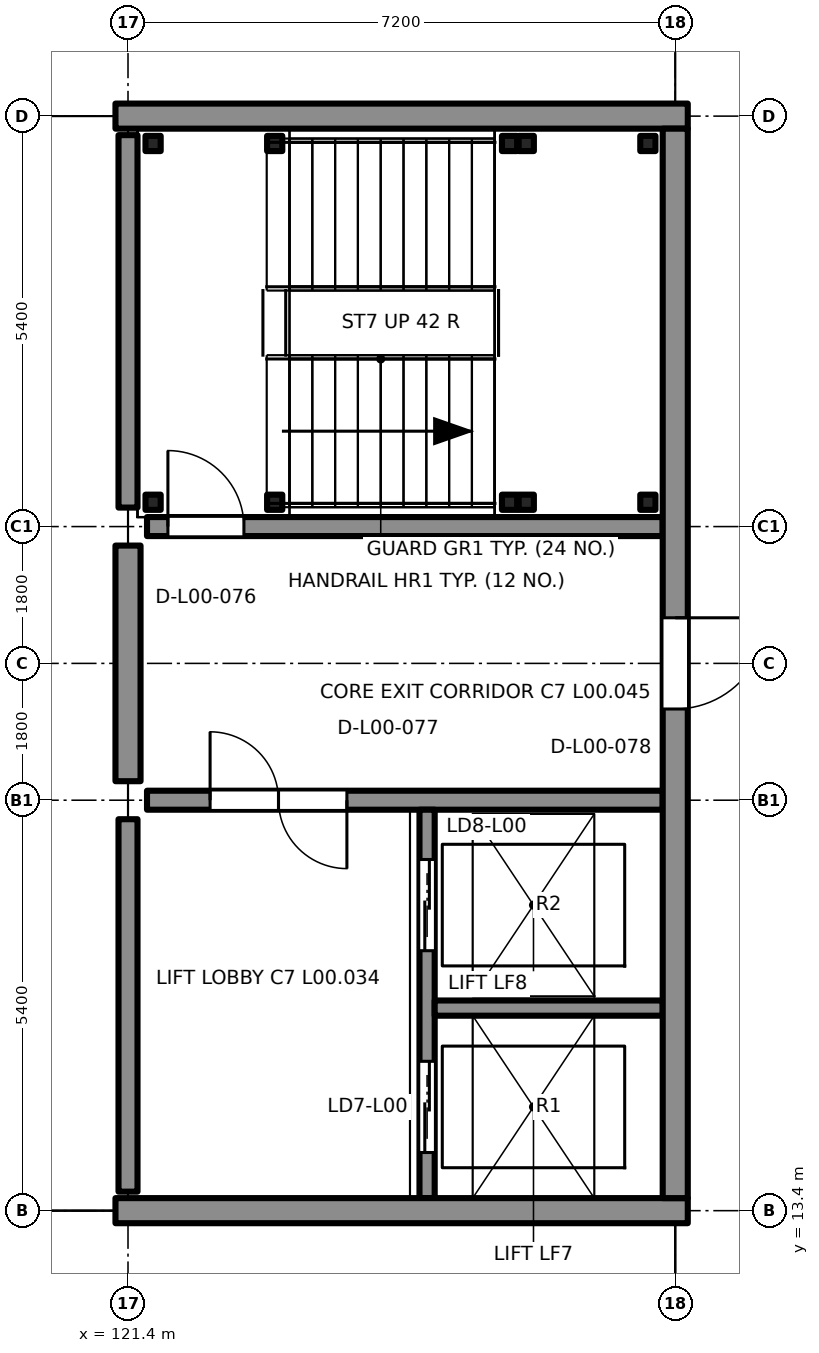
"""IFC4 building model, lengths in metres.
Left out: names, types, materials, properties, quantities, classifications, styles, units other than length and angle.
Written with IfcOpenShell. Run it as: python <this file> out.ifc"""

import sys

from ifc_helpers import new_model, si_unit, direction, frame, frame_2d, origin, origin_2d, place, context, subcontext, project, spatial, rectangle, extrude, element, fill, save


model = new_model("IFC4")
c1 = context("Model", 3, precision=1e-05, world=origin(), true_north=direction((0.0, 1.0)))
c2 = subcontext(c1, "Body", "Model", "MODEL_VIEW")
j1 = project(units=[si_unit("LENGTHUNIT", "METRE"), si_unit("PLANEANGLEUNIT", "RADIAN")], contexts=[c1])
p1 = place(None, origin())
s1 = spatial("IfcSite", under=j1, at=p1, CompositionType="ELEMENT")
p2 = place(p1, origin())
s2 = spatial("IfcBuilding", under=s1, at=p2, CompositionType="ELEMENT")
p3 = place(p2, origin())
s3 = spatial("IfcBuildingStorey", under=s2, at=p3, CompositionType="ELEMENT", Elevation=0.0)
for number, where, z_axis, x_axis in (
    (1, (115.2, 13.4, -0.2), (0.0, 0.0, 1.0), (1.0, 0.0, 0.0)),
    (2, (115.2, 27.8, -0.2), (0.0, 0.0, 1.0), (1.0, 0.0, 0.0)),
):
    element("IfcColumn", number, at=place(p3, frame(where, z_axis=z_axis, x_axis=x_axis)), inside=s3, PredefinedType="COLUMN", context=c2, shape_type="SweptSolid", body=[
        extrude(rectangle(XDim=1.6, YDim=1.2, at=origin_2d()), origin(), (0.736, 0.0, 0.677), 6.794),
    ])
p4 = place(p3, frame((121.65, 22.4, 0.0), z_axis=(0.0, 0.0, 1.0), x_axis=(1.0, 0.0, 0.0)))
e3 = element("IfcWall", 3, at=p4, inside=s3, PredefinedType="SHEAR", context=c2, shape_type="SweptSolid", body=[
    extrude(rectangle(XDim=6.785, YDim=0.25, at=frame_2d((3.393, 0.0))), origin(), (0.0, 0.0, 1.0), 5.9),
])
p5 = place(p4, frame((0.275, 0.0, 0.0)))
e4 = element("IfcOpeningElement", 4, at=p5, cuts=e3, PredefinedType="OPENING", context=c2, shape_type="SweptSolid", body=[
    extrude(rectangle(XDim=1.0, YDim=2.1, at=frame_2d((0.5, 1.05))), frame((0.0, 0.135, 0.0), z_axis=(0.0, -1.0, 0.0), x_axis=(1.0, 0.0, 0.0)), (0.0, 0.0, 1.0), 0.27),
])
p6 = place(p3, frame((121.4, 22.65, 0.0), z_axis=(0.0, 0.0, 1.0), x_axis=(0.0, 1.0, 0.0)))
e5 = element("IfcWall", 5, at=p6, inside=s3, PredefinedType="SHEAR", context=c2, shape_type="SweptSolid", body=[
    extrude(rectangle(XDim=4.9, YDim=0.25, at=frame_2d((2.45, 0.0))), origin(), (0.0, 0.0, 1.0), 4.4),
])
p7 = place(p3, frame((121.65, 18.8, -1.4), z_axis=(0.0, 0.0, 1.0), x_axis=(1.0, 0.0, 0.0)))
e6 = element("IfcWall", 6, at=p7, inside=s3, PredefinedType="SHEAR", context=c2, shape_type="SweptSolid", body=[
    extrude(rectangle(XDim=6.785, YDim=0.25, at=frame_2d((3.393, 0.0))), origin(), (0.0, 0.0, 1.0), 7.3),
])
p8 = place(p7, frame((0.83, 0.0, 1.4)))
e7 = element("IfcOpeningElement", 7, at=p8, cuts=e6, PredefinedType="OPENING", context=c2, shape_type="SweptSolid", body=[
    extrude(rectangle(XDim=1.8, YDim=2.1, at=frame_2d((0.9, 1.05))), frame((0.0, 0.135, 0.0), z_axis=(0.0, -1.0, 0.0), x_axis=(1.0, 0.0, 0.0)), (0.0, 0.0, 1.0), 0.27),
])
p9 = place(p3, frame((121.4, 13.65, -1.4), z_axis=(0.0, 0.0, 1.0), x_axis=(0.0, 1.0, 0.0)))
e8 = element("IfcWall", 8, at=p9, inside=s3, PredefinedType="SHEAR", context=c2, shape_type="SweptSolid", body=[
    extrude(rectangle(XDim=4.9, YDim=0.25, at=frame_2d((2.45, 0.0))), origin(), (0.0, 0.0, 1.0), 5.8),
])
p10 = place(p3, frame((125.335, 13.565, -1.4), z_axis=(0.0, 0.0, 1.0), x_axis=(0.0, 1.0, 0.0)))
e9 = element("IfcWall", 9, at=p10, inside=s3, PredefinedType="SHEAR", context=c2, shape_type="SweptSolid", body=[
    extrude(rectangle(XDim=5.11, YDim=0.2, at=frame_2d((2.555, 0.0))), origin(), (0.0, 0.0, 1.0), 7.3),
])
p11 = place(p10, frame((0.6, 0.0, 1.4)))
e10 = element("IfcOpeningElement", 10, at=p11, cuts=e9, PredefinedType="OPENING", context=c2, shape_type="SweptSolid", body=[
    extrude(rectangle(XDim=1.2, YDim=2.1, at=frame_2d((0.6, 1.05))), frame((0.0, 0.11, 0.0), z_axis=(0.0, -1.0, 0.0), x_axis=(1.0, 0.0, 0.0)), (0.0, 0.0, 1.0), 0.22),
])
p12 = place(p10, frame((3.255, 0.0, 1.4)))
e11 = element("IfcOpeningElement", 11, at=p12, cuts=e9, PredefinedType="OPENING", context=c2, shape_type="SweptSolid", body=[
    extrude(rectangle(XDim=1.2, YDim=2.1, at=frame_2d((0.6, 1.05))), frame((0.0, 0.11, 0.0), z_axis=(0.0, -1.0, 0.0), x_axis=(1.0, 0.0, 0.0)), (0.0, 0.0, 1.0), 0.22),
])
p13 = place(p3, frame((128.435, 16.065, -1.4), z_axis=(0.0, 0.0, 1.0), x_axis=(-1.0, 0.0, 0.0)))
e12 = element("IfcWall", 12, at=p13, inside=s3, PredefinedType="SHEAR", context=c2, shape_type="SweptSolid", body=[
    extrude(rectangle(XDim=3.0, YDim=0.2, at=frame_2d((1.5, 0.0))), origin(), (0.0, 0.0, 1.0), 7.3),
])
p14 = place(p3, frame((128.6, 13.565, -1.4), z_axis=(0.0, 0.0, 1.0), x_axis=(0.0, 1.0, 0.0)))
e13 = element("IfcWall", 13, at=p14, inside=s3, PredefinedType="SHEAR", context=c2, shape_type="SweptSolid", body=[
    extrude(rectangle(XDim=5.11, YDim=0.25, at=frame_2d((2.555, 0.0))), origin(), (0.0, 0.0, 1.0), 1.4),
])
p15 = place(p3, frame((125.235, 13.4, -1.4), z_axis=(0.0, 0.0, 1.0), x_axis=(1.0, 0.0, 0.0)))
e14 = element("IfcWall", 14, at=p15, inside=s3, PredefinedType="SHEAR", context=c2, shape_type="SweptSolid", body=[
    extrude(rectangle(XDim=3.365, YDim=0.25, at=frame_2d((1.683, 0.0))), origin(), (0.0, 0.0, 1.0), 1.4),
])
for number, where, z_axis, x_axis in (
    (15, (126.42, 22.72, 0.0), (0.0, 0.0, 1.0), (1.0, 0.0, 0.0)),
    (16, (126.42, 27.44, 0.0), (0.0, 0.0, 1.0), (1.0, 0.0, 0.0)),
):
    element("IfcColumn", number, at=place(p3, frame(where, z_axis=z_axis, x_axis=x_axis)), inside=s3, PredefinedType="COLUMN", context=c2, shape_type="SweptSolid", body=[
        extrude(rectangle(XDim=0.2, YDim=0.2, at=origin_2d()), origin(), (0.0, 0.0, 1.0), 4.45),
    ])
for number, where, z_axis, x_axis in (
    (17, (128.24, 22.72, 0.0), (0.0, 0.0, 1.0), (1.0, 0.0, 0.0)),
    (18, (128.24, 27.44, 0.0), (0.0, 0.0, 1.0), (1.0, 0.0, 0.0)),
):
    element("IfcColumn", number, at=place(p3, frame(where, z_axis=z_axis, x_axis=x_axis)), inside=s3, PredefinedType="COLUMN", context=c2, shape_type="SweptSolid", body=[
        extrude(rectangle(XDim=0.2, YDim=0.2, at=origin_2d()), origin(), (0.0, 0.0, 1.0), 6.3),
    ])
for number, where, z_axis, x_axis in (
    (19, (121.73, 22.72, 0.0), (0.0, 0.0, 1.0), (1.0, 0.0, 0.0)),
    (20, (121.73, 27.44, 0.0), (0.0, 0.0, 1.0), (1.0, 0.0, 0.0)),
    (21, (123.33, 22.72, 0.0), (0.0, 0.0, 1.0), (1.0, 0.0, 0.0)),
    (22, (123.33, 27.44, 0.0), (0.0, 0.0, 1.0), (1.0, 0.0, 0.0)),
):
    element("IfcColumn", number, at=place(p3, frame(where, z_axis=z_axis, x_axis=x_axis)), inside=s3, PredefinedType="COLUMN", context=c2, shape_type="SweptSolid", body=[
        extrude(rectangle(XDim=0.2, YDim=0.2, at=origin_2d()), origin(), (0.0, 0.0, 1.0), 2.95),
    ])
for number, where, z_axis, x_axis in (
    (23, (126.64, 22.72, 0.0), (0.0, 0.0, 1.0), (1.0, 0.0, 0.0)),
    (24, (126.64, 27.44, 0.0), (0.0, 0.0, 1.0), (1.0, 0.0, 0.0)),
):
    element("IfcColumn", number, at=place(p3, frame(where, z_axis=z_axis, x_axis=x_axis)), inside=s3, PredefinedType="COLUMN", context=c2, shape_type="SweptSolid", body=[
        extrude(rectangle(XDim=0.2, YDim=0.2, at=origin_2d()), origin(), (0.0, 0.0, 1.0), 6.3),
    ])
for number, where, z_axis, x_axis in (
    (25, (121.235, 13.4, 0.0), (0.0, 0.0, 1.0), (1.0, 0.0, 0.0)),
    (26, (121.235, 27.8, 0.0), (0.0, 0.0, 1.0), (1.0, 0.0, 0.0)),
):
    element("IfcWall", number, at=place(p3, frame(where, z_axis=z_axis, x_axis=x_axis)), inside=s3, PredefinedType="SOLIDWALL", context=c2, shape_type="SweptSolid", body=[
        extrude(rectangle(XDim=7.53, YDim=0.33, at=frame_2d((3.765, 0.0))), origin(), (0.0, 0.0, 1.0), 5.5),
    ])
p16 = place(p3, frame((121.4, 19.05, 0.0), z_axis=(0.0, 0.0, 1.0), x_axis=(0.0, 1.0, 0.0)))
e27 = element("IfcWall", 27, at=p16, inside=s3, PredefinedType="SOLIDWALL", context=c2, shape_type="SweptSolid", body=[
    extrude(rectangle(XDim=3.1, YDim=0.33, at=frame_2d((1.55, 0.0))), origin(), (0.0, 0.0, 1.0), 5.5),
])
p17 = place(p3, frame((128.6, 27.635, 0.0), z_axis=(0.0, 0.0, 1.0), x_axis=(0.0, -1.0, 0.0)))
e28 = element("IfcWall", 28, at=p17, inside=s3, PredefinedType="SOLIDWALL", context=c2, shape_type="SweptSolid", body=[
    extrude(rectangle(XDim=14.07, YDim=0.33, at=frame_2d((7.035, 0.0))), origin(), (0.0, 0.0, 1.0), 5.5),
])
p18 = place(p17, frame((6.435, 0.0, 0.0)))
e29 = element("IfcOpeningElement", 29, at=p18, cuts=e28, PredefinedType="OPENING", context=c2, shape_type="SweptSolid", body=[
    extrude(rectangle(XDim=1.2, YDim=2.1, at=frame_2d((0.6, 1.05))), frame((0.0, 0.175, 0.0), z_axis=(0.0, -1.0, 0.0), x_axis=(1.0, 0.0, 0.0)), (0.0, 0.0, 1.0), 0.35),
])
p19 = place(p5, origin())
e30 = element("IfcDoor", 30, at=p19, inside=s3, OperationType="SINGLE_SWING_RIGHT", PredefinedType="DOOR", context=c2, shape_type="SweptSolid", body=[
    extrude(rectangle(XDim=1.0, YDim=2.1, at=frame_2d((0.5, 1.05))), frame((0.0, 0.025, 0.0), z_axis=(0.0, -1.0, 0.0), x_axis=(1.0, 0.0, 0.0)), (0.0, 0.0, 1.0), 0.05),
])
fill(e4, e30)
p20 = place(p8, origin())
e31 = element("IfcDoor", 31, at=p20, inside=s3, OperationType="DOUBLE_DOOR_SINGLE_SWING", PredefinedType="DOOR", context=c2, shape_type="SweptSolid", body=[
    extrude(rectangle(XDim=1.8, YDim=2.1, at=frame_2d((0.9, 1.05))), frame((0.0, 0.025, 0.0), z_axis=(0.0, -1.0, 0.0), x_axis=(1.0, 0.0, 0.0)), (0.0, 0.0, 1.0), 0.05),
])
fill(e7, e31)
p21 = place(p11, origin())
e32 = element("IfcDoor", 32, at=p21, inside=s3, OperationType="DOUBLE_DOOR_SLIDING", PredefinedType="DOOR", context=c2, shape_type="SweptSolid", body=[
    extrude(rectangle(XDim=1.2, YDim=2.1, at=frame_2d((0.6, 1.05))), frame((0.0, 0.025, 0.0), z_axis=(0.0, -1.0, 0.0), x_axis=(1.0, 0.0, 0.0)), (0.0, 0.0, 1.0), 0.05),
])
fill(e10, e32)
p22 = place(p12, origin())
e33 = element("IfcDoor", 33, at=p22, inside=s3, OperationType="DOUBLE_DOOR_SLIDING", PredefinedType="DOOR", context=c2, shape_type="SweptSolid", body=[
    extrude(rectangle(XDim=1.2, YDim=2.1, at=frame_2d((0.6, 1.05))), frame((0.0, 0.025, 0.0), z_axis=(0.0, -1.0, 0.0), x_axis=(1.0, 0.0, 0.0)), (0.0, 0.0, 1.0), 0.05),
])
fill(e11, e33)
p23 = place(p18, origin())
e34 = element("IfcDoor", 34, at=p23, inside=s3, OperationType="SINGLE_SWING_LEFT", PredefinedType="DOOR", context=c2, shape_type="SweptSolid", body=[
    extrude(rectangle(XDim=1.2, YDim=2.1, at=frame_2d((0.6, 1.05))), frame((0.0, 0.025, 0.0), z_axis=(0.0, -1.0, 0.0), x_axis=(1.0, 0.0, 0.0)), (0.0, 0.0, 1.0), 0.05),
])
fill(e29, e34)
save(model, sys.argv[1])
